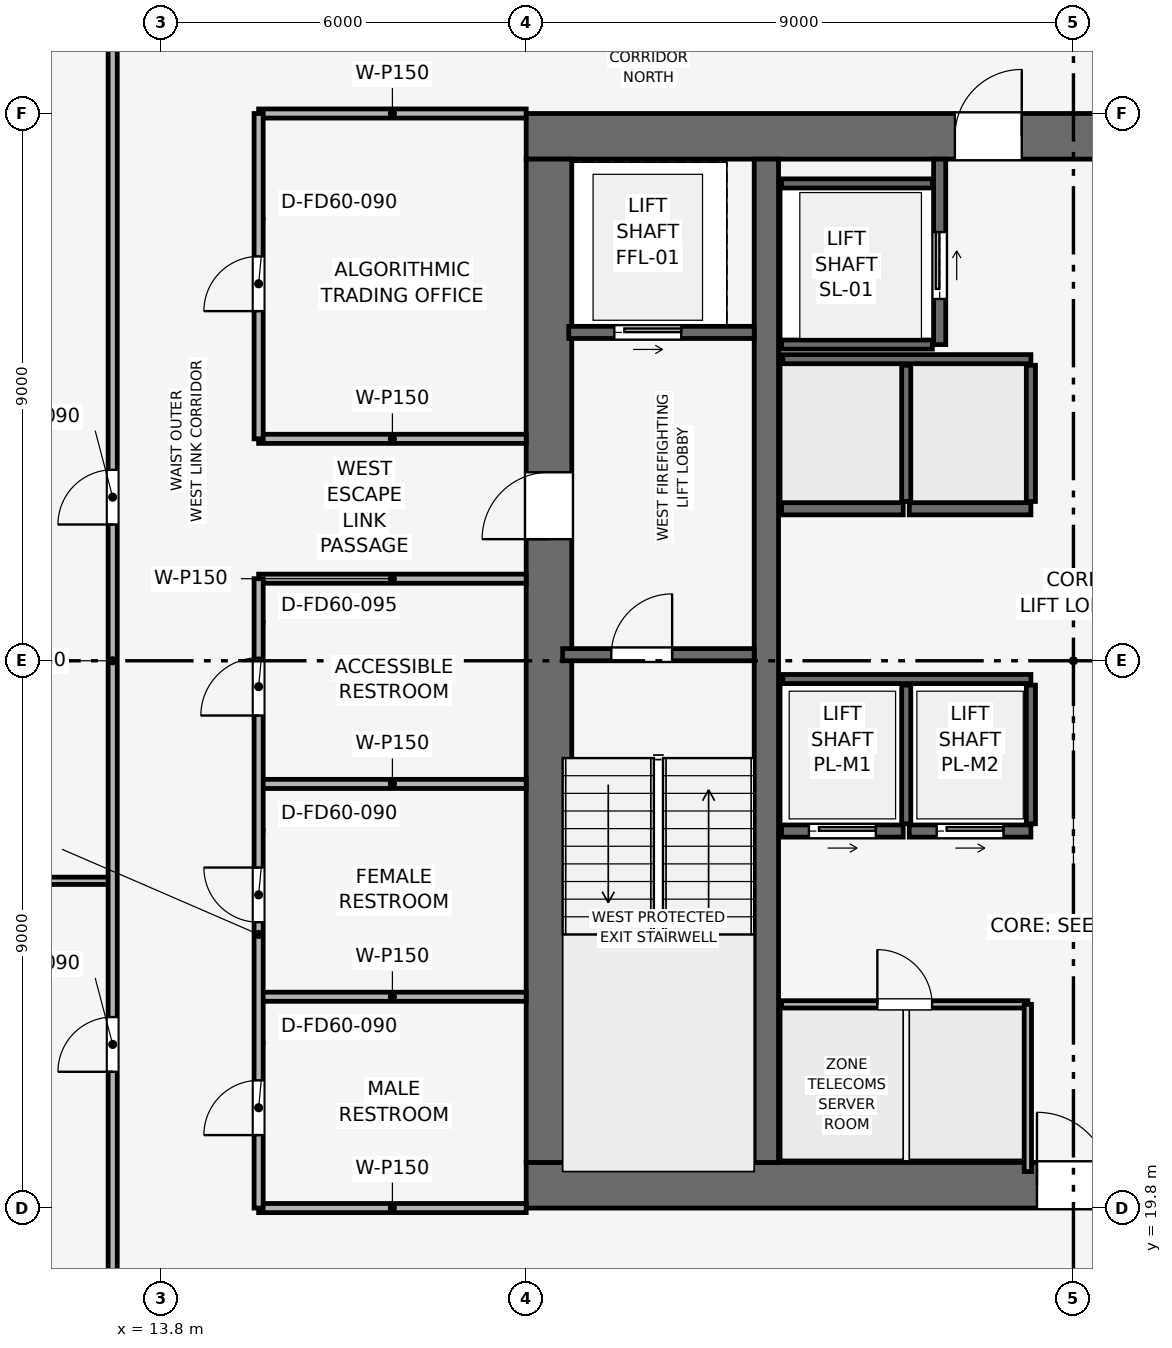
"""IFC4 building model, lengths in metres.
Left out: names, types, materials, properties, quantities, classifications, styles, units other than length and angle.
Written with IfcOpenShell. Run it as: python <this file> out.ifc"""

import sys

from ifc_helpers import new_model, si_unit, direction, frame, frame_2d, origin, place, context, subcontext, project, spatial, rectangle, extrude, element, fill, save


model = new_model("IFC4")
c1 = context("Model", 3, precision=1e-05, world=origin(), true_north=direction((0.0, 1.0)))
c2 = subcontext(c1, "Body", "Model", "MODEL_VIEW")
j1 = project(units=[si_unit("LENGTHUNIT", "METRE"), si_unit("PLANEANGLEUNIT", "RADIAN")], contexts=[c1])
p1 = place(None, origin())
s1 = spatial("IfcSite", under=j1, at=p1, CompositionType="ELEMENT")
p2 = place(p1, origin())
s2 = spatial("IfcBuilding", under=s1, at=p2, CompositionType="ELEMENT")
p3 = place(p2, frame((0.0, 0.0, 218.7)))
s3 = spatial("IfcBuildingStorey", under=s2, at=p3, CompositionType="ELEMENT", Elevation=218.7)
p4 = place(p3, frame((19.8, 20.175, 0.0), z_axis=(0.0, 0.0, 1.0), x_axis=(1.0, 0.0, 0.0)))
e1 = element("IfcWall", 1, at=p4, inside=s3, PredefinedType="SHEAR", context=c2, shape_type="SweptSolid", body=[
    extrude(rectangle(XDim=18.0, YDim=0.75, at=frame_2d((9.0, 0.0))), origin(), (0.0, 0.0, 1.0), 3.75),
])
p5 = place(p4, frame((8.4, 0.0, 0.0)))
e2 = element("IfcOpeningElement", 2, at=p5, cuts=e1, PredefinedType="OPENING", context=c2, shape_type="SweptSolid", body=[
    extrude(rectangle(XDim=1.2, YDim=2.2, at=frame_2d((0.6, 1.1))), frame((0.0, 0.385, 0.0), z_axis=(0.0, -1.0, 0.0), x_axis=(1.0, 0.0, 0.0)), (0.0, 0.0, 1.0), 0.77),
])
p6 = place(p3, frame((19.8, 37.425, 0.0), z_axis=(0.0, 0.0, 1.0), x_axis=(1.0, 0.0, 0.0)))
e3 = element("IfcWall", 3, at=p6, inside=s3, PredefinedType="SHEAR", context=c2, shape_type="SweptSolid", body=[
    extrude(rectangle(XDim=18.0, YDim=0.75, at=frame_2d((9.0, 0.0))), origin(), (0.0, 0.0, 1.0), 3.75),
])
p7 = place(p6, frame((7.05, 0.0, 0.0)))
e4 = element("IfcOpeningElement", 4, at=p7, cuts=e3, PredefinedType="OPENING", context=c2, shape_type="SweptSolid", body=[
    extrude(rectangle(XDim=1.1, YDim=2.15, at=frame_2d((0.55, 1.075))), frame((0.0, 0.385, 0.0), z_axis=(0.0, -1.0, 0.0), x_axis=(1.0, 0.0, 0.0)), (0.0, 0.0, 1.0), 0.77),
])
p8 = place(p3, frame((20.175, 20.55, 0.0), z_axis=(0.0, 0.0, 1.0), x_axis=(0.0, 1.0, 0.0)))
e5 = element("IfcWall", 5, at=p8, inside=s3, PredefinedType="SHEAR", context=c2, shape_type="SweptSolid", body=[
    extrude(rectangle(XDim=16.5, YDim=0.75, at=frame_2d((8.25, 0.0))), origin(), (0.0, 0.0, 1.0), 3.75),
])
p9 = place(p8, frame((10.25, 0.0, 0.0)))
e6 = element("IfcOpeningElement", 6, at=p9, cuts=e5, PredefinedType="OPENING", context=c2, shape_type="SweptSolid", body=[
    extrude(rectangle(XDim=1.1, YDim=2.15, at=frame_2d((0.55, 1.075))), frame((0.0, 0.385, 0.0), z_axis=(0.0, -1.0, 0.0), x_axis=(1.0, 0.0, 0.0)), (0.0, 0.0, 1.0), 0.77),
])
p10 = place(p3, frame((23.75, 20.55, 0.0), z_axis=(0.0, 0.0, 1.0), x_axis=(0.0, 1.0, 0.0)))
e7 = element("IfcWall", 7, at=p10, inside=s3, PredefinedType="SHEAR", context=c2, shape_type="SweptSolid", body=[
    extrude(rectangle(XDim=16.5, YDim=0.4, at=frame_2d((8.25, 0.0))), origin(), (0.0, 0.0, 1.0), 3.75),
])
p11 = place(p3, frame((20.4, 28.9, 0.0), z_axis=(0.0, 0.0, 1.0), x_axis=(1.0, 0.0, 0.0)))
e8 = element("IfcWall", 8, at=p11, inside=s3, PredefinedType="SHEAR", context=c2, shape_type="SweptSolid", body=[
    extrude(rectangle(XDim=3.15, YDim=0.2, at=frame_2d((1.575, 0.0))), origin(), (0.0, 0.0, 1.0), 3.5),
])
p12 = place(p11, frame((0.8, 0.0, 0.0)))
e9 = element("IfcOpeningElement", 9, at=p12, cuts=e8, PredefinedType="OPENING", context=c2, shape_type="SweptSolid", body=[
    extrude(rectangle(XDim=1.0, YDim=2.1, at=frame_2d((0.5, 1.05))), frame((0.0, 0.11, 0.0), z_axis=(0.0, -1.0, 0.0), x_axis=(1.0, 0.0, 0.0)), (0.0, 0.0, 1.0), 0.22),
])
p13 = place(p3, frame((20.5, 34.2, 0.0), z_axis=(0.0, 0.0, 1.0), x_axis=(1.0, 0.0, 0.0)))
e10 = element("IfcWall", 10, at=p13, inside=s3, PredefinedType="SHEAR", context=c2, shape_type="SweptSolid", body=[
    extrude(rectangle(XDim=3.05, YDim=0.2, at=frame_2d((1.525, 0.0))), origin(), (0.0, 0.0, 1.0), 3.5),
])
p14 = place(p13, frame((0.75, 0.0, 0.0)))
e11 = element("IfcOpeningElement", 11, at=p14, cuts=e10, PredefinedType="OPENING", context=c2, shape_type="SweptSolid", body=[
    extrude(rectangle(XDim=1.1, YDim=2.15, at=frame_2d((0.55, 1.075))), frame((0.0, 0.11, 0.0), z_axis=(0.0, -1.0, 0.0), x_axis=(1.0, 0.0, 0.0)), (0.0, 0.0, 1.0), 0.22),
])
p15 = place(p3, frame((26.6, 34.0, 0.0), z_axis=(0.0, 0.0, 1.0), x_axis=(0.0, 1.0, 0.0)))
e12 = element("IfcWall", 12, at=p15, inside=s3, PredefinedType="SHEAR", context=c2, shape_type="SweptSolid", body=[
    extrude(rectangle(XDim=3.05, YDim=0.2, at=frame_2d((1.525, 0.0))), origin(), (0.0, 0.0, 1.0), 3.5),
])
p16 = place(p15, frame((0.75, 0.0, 0.0)))
e13 = element("IfcOpeningElement", 13, at=p16, cuts=e12, PredefinedType="OPENING", context=c2, shape_type="SweptSolid", body=[
    extrude(rectangle(XDim=1.1, YDim=2.15, at=frame_2d((0.55, 1.075))), frame((0.0, 0.11, 0.0), z_axis=(0.0, -1.0, 0.0), x_axis=(1.0, 0.0, 0.0)), (0.0, 0.0, 1.0), 0.22),
])
for number, where, z_axis, x_axis in (
    (14, (24.0, 34.0, 0.0), (0.0, 0.0, 1.0), (1.0, 0.0, 0.0)),
    (15, (24.0, 36.65, 0.0), (0.0, 0.0, 1.0), (1.0, 0.0, 0.0)),
):
    element("IfcWall", number, at=place(p3, frame(where, z_axis=z_axis, x_axis=x_axis)), inside=s3, PredefinedType="SHEAR", context=c2, shape_type="SweptSolid", body=[
        extrude(rectangle(XDim=2.48, YDim=0.15, at=frame_2d((1.24, 0.0))), origin(), (0.0, 0.0, 1.0), 3.5),
    ])
p17 = place(p3, frame((24.0, 26.0, 0.0), z_axis=(0.0, 0.0, 1.0), x_axis=(1.0, 0.0, 0.0)))
e16 = element("IfcWall", 16, at=p17, inside=s3, PredefinedType="SHEAR", context=c2, shape_type="SweptSolid", body=[
    extrude(rectangle(XDim=2.0, YDim=0.2, at=frame_2d((1.0, 0.0))), origin(), (0.0, 0.0, 1.0), 3.5),
])
p18 = place(p17, frame((0.45, 0.0, 0.0)))
e17 = element("IfcOpeningElement", 17, at=p18, cuts=e16, PredefinedType="OPENING", context=c2, shape_type="SweptSolid", body=[
    extrude(rectangle(XDim=1.1, YDim=2.15, at=frame_2d((0.55, 1.075))), frame((0.0, 0.11, 0.0), z_axis=(0.0, -1.0, 0.0), x_axis=(1.0, 0.0, 0.0)), (0.0, 0.0, 1.0), 0.22),
])
p19 = place(p3, frame((26.1, 26.0, 0.0), z_axis=(0.0, 0.0, 1.0), x_axis=(1.0, 0.0, 0.0)))
e18 = element("IfcWall", 18, at=p19, inside=s3, PredefinedType="SHEAR", context=c2, shape_type="SweptSolid", body=[
    extrude(rectangle(XDim=2.0, YDim=0.2, at=frame_2d((1.0, 0.0))), origin(), (0.0, 0.0, 1.0), 3.5),
])
p20 = place(p19, frame((0.45, 0.0, 0.0)))
e19 = element("IfcOpeningElement", 19, at=p20, cuts=e18, PredefinedType="OPENING", context=c2, shape_type="SweptSolid", body=[
    extrude(rectangle(XDim=1.1, YDim=2.15, at=frame_2d((0.55, 1.075))), frame((0.0, 0.11, 0.0), z_axis=(0.0, -1.0, 0.0), x_axis=(1.0, 0.0, 0.0)), (0.0, 0.0, 1.0), 0.22),
])
for number, where, z_axis, x_axis in (
    (20, (24.0, 31.3, 0.0), (0.0, 0.0, 1.0), (1.0, 0.0, 0.0)),
    (21, (26.1, 31.3, 0.0), (0.0, 0.0, 1.0), (1.0, 0.0, 0.0)),
):
    element("IfcWall", number, at=place(p3, frame(where, z_axis=z_axis, x_axis=x_axis)), inside=s3, PredefinedType="SHEAR", context=c2, shape_type="SweptSolid", body=[
        extrude(rectangle(XDim=2.0, YDim=0.2, at=frame_2d((1.0, 0.0))), origin(), (0.0, 0.0, 1.0), 3.5),
    ])
p21 = place(p3, frame((24.02, 28.5, 0.0), z_axis=(0.0, 0.0, 1.0), x_axis=(1.0, 0.0, 0.0)))
e22 = element("IfcWall", 22, at=p21, inside=s3, PredefinedType="SHEAR", context=c2, shape_type="SweptSolid", body=[
    extrude(rectangle(XDim=4.08, YDim=0.15, at=frame_2d((2.04, 0.0))), origin(), (0.0, 0.0, 1.0), 3.5),
])
for number, where, z_axis, x_axis in (
    (23, (26.05, 26.12, 0.0), (0.0, 0.0, 1.0), (0.0, 1.0, 0.0)),
    (24, (28.1, 26.12, 0.0), (0.0, 0.0, 1.0), (0.0, 1.0, 0.0)),
):
    element("IfcWall", number, at=place(p3, frame(where, z_axis=z_axis, x_axis=x_axis)), inside=s3, PredefinedType="SHEAR", context=c2, shape_type="SweptSolid", body=[
        extrude(rectangle(XDim=2.28, YDim=0.15, at=frame_2d((1.14, 0.0))), origin(), (0.0, 0.0, 1.0), 3.5),
    ])
p22 = place(p3, frame((24.02, 33.76, 0.0), z_axis=(0.0, 0.0, 1.0), x_axis=(1.0, 0.0, 0.0)))
e25 = element("IfcWall", 25, at=p22, inside=s3, PredefinedType="SHEAR", context=c2, shape_type="SweptSolid", body=[
    extrude(rectangle(XDim=4.08, YDim=0.15, at=frame_2d((2.04, 0.0))), origin(), (0.0, 0.0, 1.0), 3.5),
])
for number, where, z_axis, x_axis in (
    (26, (26.05, 31.42, 0.0), (0.0, 0.0, 1.0), (0.0, 1.0, 0.0)),
    (27, (28.1, 31.42, 0.0), (0.0, 0.0, 1.0), (0.0, 1.0, 0.0)),
):
    element("IfcWall", number, at=place(p3, frame(where, z_axis=z_axis, x_axis=x_axis)), inside=s3, PredefinedType="SHEAR", context=c2, shape_type="SweptSolid", body=[
        extrude(rectangle(XDim=2.24, YDim=0.15, at=frame_2d((1.12, 0.0))), origin(), (0.0, 0.0, 1.0), 3.5),
    ])
p23 = place(p3, frame((24.0, 23.15, 0.0), z_axis=(0.0, 0.0, 1.0), x_axis=(1.0, 0.0, 0.0)))
e28 = element("IfcWall", 28, at=p23, inside=s3, PredefinedType="PARTITIONING", context=c2, shape_type="SweptSolid", body=[
    extrude(rectangle(XDim=4.05, YDim=0.12, at=frame_2d((2.025, 0.0))), origin(), (0.0, 0.0, 1.0), 3.5),
])
p24 = place(p23, frame((1.575, 0.0, 0.0)))
e29 = element("IfcOpeningElement", 29, at=p24, cuts=e28, PredefinedType="OPENING", context=c2, shape_type="SweptSolid", body=[
    extrude(rectangle(XDim=0.9, YDim=2.1, at=frame_2d((0.45, 1.05))), frame((0.0, 0.07, 0.0), z_axis=(0.0, -1.0, 0.0), x_axis=(1.0, 0.0, 0.0)), (0.0, 0.0, 1.0), 0.14),
])
p25 = place(p3, frame((28.05, 20.4, 0.0), z_axis=(0.0, 0.0, 1.0), x_axis=(0.0, 1.0, 0.0)))
e30 = element("IfcWall", 30, at=p25, inside=s3, PredefinedType="PARTITIONING", context=c2, shape_type="SweptSolid", body=[
    extrude(rectangle(XDim=2.75, YDim=0.12, at=frame_2d((1.375, 0.0))), origin(), (0.0, 0.0, 1.0), 3.5),
])
p26 = place(p3, frame((15.4, 19.8, 0.0), z_axis=(0.0, 0.0, 1.0), x_axis=(1.0, 0.0, 0.0)))
e31 = element("IfcWall", 31, at=p26, inside=s3, PredefinedType="PARTITIONING", context=c2, shape_type="SweptSolid", body=[
    extrude(rectangle(XDim=4.4, YDim=0.15, at=frame_2d((2.2, 0.0))), origin(), (0.0, 0.0, 1.0), 3.035),
])
for number, where, z_axis, x_axis in (
    (32, (15.4, 23.275, 0.0), (0.0, 0.0, 1.0), (1.0, 0.0, 0.0)),
    (33, (15.4, 26.775, 0.0), (0.0, 0.0, 1.0), (1.0, 0.0, 0.0)),
    (34, (15.4, 30.15, 0.0), (0.0, 0.0, 1.0), (1.0, 0.0, 0.0)),
    (35, (15.4, 32.45, 0.0), (0.0, 0.0, 1.0), (1.0, 0.0, 0.0)),
):
    element("IfcWall", number, at=place(p3, frame(where, z_axis=z_axis, x_axis=x_axis)), inside=s3, PredefinedType="PARTITIONING", context=c2, shape_type="SweptSolid", body=[
        extrude(rectangle(XDim=4.4, YDim=0.15, at=frame_2d((2.2, 0.0))), origin(), (0.0, 0.0, 1.0), 3.5),
    ])
p27 = place(p3, frame((15.4, 37.8, 0.0), z_axis=(0.0, 0.0, 1.0), x_axis=(1.0, 0.0, 0.0)))
e36 = element("IfcWall", 36, at=p27, inside=s3, PredefinedType="PARTITIONING", context=c2, shape_type="SweptSolid", body=[
    extrude(rectangle(XDim=4.4, YDim=0.15, at=frame_2d((2.2, 0.0))), origin(), (0.0, 0.0, 1.0), 3.035),
])
p28 = place(p3, frame((15.4, 19.8, 0.0), z_axis=(0.0, 0.0, 1.0), x_axis=(0.0, 1.0, 0.0)))
e37 = element("IfcWall", 37, at=p28, inside=s3, PredefinedType="PARTITIONING", context=c2, shape_type="SweptSolid", body=[
    extrude(rectangle(XDim=10.35, YDim=0.15, at=frame_2d((5.175, 0.0))), origin(), (0.0, 0.0, 1.0), 3.035),
])
p29 = place(p28, frame((1.2, 0.0, 0.0)))
e38 = element("IfcOpeningElement", 38, at=p29, cuts=e37, PredefinedType="OPENING", context=c2, shape_type="SweptSolid", body=[
    extrude(rectangle(XDim=0.9, YDim=2.1, at=frame_2d((0.45, 1.05))), frame((0.0, 0.085, 0.0), z_axis=(0.0, -1.0, 0.0), x_axis=(1.0, 0.0, 0.0)), (0.0, 0.0, 1.0), 0.17),
])
p30 = place(p28, frame((4.7, 0.0, 0.0)))
e39 = element("IfcOpeningElement", 39, at=p30, cuts=e37, PredefinedType="OPENING", context=c2, shape_type="SweptSolid", body=[
    extrude(rectangle(XDim=0.9, YDim=2.1, at=frame_2d((0.45, 1.05))), frame((0.0, 0.085, 0.0), z_axis=(0.0, -1.0, 0.0), x_axis=(1.0, 0.0, 0.0)), (0.0, 0.0, 1.0), 0.17),
])
p31 = place(p28, frame((8.1, 0.0, 0.0)))
e40 = element("IfcOpeningElement", 40, at=p31, cuts=e37, PredefinedType="OPENING", context=c2, shape_type="SweptSolid", body=[
    extrude(rectangle(XDim=0.95, YDim=2.1, at=frame_2d((0.475, 1.05))), frame((0.0, 0.085, 0.0), z_axis=(0.0, -1.0, 0.0), x_axis=(1.0, 0.0, 0.0)), (0.0, 0.0, 1.0), 0.17),
])
p32 = place(p3, frame((15.4, 32.45, 0.0), z_axis=(0.0, 0.0, 1.0), x_axis=(0.0, 1.0, 0.0)))
e41 = element("IfcWall", 41, at=p32, inside=s3, PredefinedType="PARTITIONING", context=c2, shape_type="SweptSolid", body=[
    extrude(rectangle(XDim=5.35, YDim=0.15, at=frame_2d((2.675, 0.0))), origin(), (0.0, 0.0, 1.0), 3.035),
])
p33 = place(p32, frame((2.1, 0.0, 0.0)))
e42 = element("IfcOpeningElement", 42, at=p33, cuts=e41, PredefinedType="OPENING", context=c2, shape_type="SweptSolid", body=[
    extrude(rectangle(XDim=0.9, YDim=2.1, at=frame_2d((0.45, 1.05))), frame((0.0, 0.085, 0.0), z_axis=(0.0, -1.0, 0.0), x_axis=(1.0, 0.0, 0.0)), (0.0, 0.0, 1.0), 0.17),
])
p34 = place(p3, frame((1.93, 25.182, 0.0), z_axis=(0.0, 0.0, 1.0), x_axis=(1.0, 0.0, 0.0)))
e43 = element("IfcWall", 43, at=p34, inside=s3, PredefinedType="PARTITIONING", context=c2, shape_type="SweptSolid", body=[
    extrude(rectangle(XDim=11.07, YDim=0.12, at=frame_2d((5.535, 0.0))), origin(), (0.0, 0.0, 1.0), 2.885),
])
p35 = place(p3, frame((13.0, 17.4, 0.0), z_axis=(0.0, 0.0, 1.0), x_axis=(0.0, 1.0, 0.0)))
e44 = element("IfcWall", 44, at=p35, inside=s3, PredefinedType="PARTITIONING", context=c2, shape_type="SweptSolid", body=[
    extrude(rectangle(XDim=22.8, YDim=0.15, at=frame_2d((11.4, 0.0))), origin(), (0.0, 0.0, 1.0), 3.035),
])
p36 = place(p35, frame((4.641, 0.0, 0.0)))
e45 = element("IfcOpeningElement", 45, at=p36, cuts=e44, PredefinedType="OPENING", context=c2, shape_type="SweptSolid", body=[
    extrude(rectangle(XDim=0.9, YDim=2.1, at=frame_2d((0.45, 1.05))), frame((0.0, 0.085, 0.0), z_axis=(0.0, -1.0, 0.0), x_axis=(1.0, 0.0, 0.0)), (0.0, 0.0, 1.0), 0.17),
])
p37 = place(p35, frame((13.641, 0.0, 0.0)))
e46 = element("IfcOpeningElement", 46, at=p37, cuts=e44, PredefinedType="OPENING", context=c2, shape_type="SweptSolid", body=[
    extrude(rectangle(XDim=0.9, YDim=2.1, at=frame_2d((0.45, 1.05))), frame((0.0, 0.085, 0.0), z_axis=(0.0, -1.0, 0.0), x_axis=(1.0, 0.0, 0.0)), (0.0, 0.0, 1.0), 0.17),
])
p38 = place(p12, origin())
e47 = element("IfcDoor", 47, at=p38, inside=s3, OperationType="SINGLE_SWING_RIGHT", PredefinedType="DOOR", context=c2, shape_type="SweptSolid", body=[
    extrude(rectangle(XDim=1.0, YDim=2.1, at=frame_2d((0.5, 1.05))), frame((0.0, 0.025, 0.0), z_axis=(0.0, -1.0, 0.0), x_axis=(1.0, 0.0, 0.0)), (0.0, 0.0, 1.0), 0.05),
])
fill(e9, e47)
p39 = place(p14, origin())
e48 = element("IfcDoor", 48, at=p39, inside=s3, OperationType="SLIDING_TO_RIGHT", PredefinedType="DOOR", context=c2, shape_type="SweptSolid", body=[
    extrude(rectangle(XDim=1.1, YDim=2.15, at=frame_2d((0.55, 1.075))), frame((0.0, 0.025, 0.0), z_axis=(0.0, -1.0, 0.0), x_axis=(1.0, 0.0, 0.0)), (0.0, 0.0, 1.0), 0.05),
])
fill(e11, e48)
p40 = place(p16, origin())
e49 = element("IfcDoor", 49, at=p40, inside=s3, OperationType="SLIDING_TO_RIGHT", PredefinedType="DOOR", context=c2, shape_type="SweptSolid", body=[
    extrude(rectangle(XDim=1.1, YDim=2.15, at=frame_2d((0.55, 1.075))), frame((0.0, 0.025, 0.0), z_axis=(0.0, -1.0, 0.0), x_axis=(1.0, 0.0, 0.0)), (0.0, 0.0, 1.0), 0.05),
])
fill(e13, e49)
p41 = place(p18, origin())
e50 = element("IfcDoor", 50, at=p41, inside=s3, OperationType="SLIDING_TO_RIGHT", PredefinedType="DOOR", context=c2, shape_type="SweptSolid", body=[
    extrude(rectangle(XDim=1.1, YDim=2.15, at=frame_2d((0.55, 1.075))), frame((0.0, 0.025, 0.0), z_axis=(0.0, -1.0, 0.0), x_axis=(1.0, 0.0, 0.0)), (0.0, 0.0, 1.0), 0.05),
])
fill(e17, e50)
p42 = place(p20, origin())
e51 = element("IfcDoor", 51, at=p42, inside=s3, OperationType="SLIDING_TO_RIGHT", PredefinedType="DOOR", context=c2, shape_type="SweptSolid", body=[
    extrude(rectangle(XDim=1.1, YDim=2.15, at=frame_2d((0.55, 1.075))), frame((0.0, 0.025, 0.0), z_axis=(0.0, -1.0, 0.0), x_axis=(1.0, 0.0, 0.0)), (0.0, 0.0, 1.0), 0.05),
])
fill(e19, e51)
p43 = place(p24, origin())
e52 = element("IfcDoor", 52, at=p43, inside=s3, OperationType="SINGLE_SWING_LEFT", PredefinedType="DOOR", context=c2, shape_type="SweptSolid", body=[
    extrude(rectangle(XDim=0.9, YDim=2.1, at=frame_2d((0.45, 1.05))), frame((0.0, 0.025, 0.0), z_axis=(0.0, -1.0, 0.0), x_axis=(1.0, 0.0, 0.0)), (0.0, 0.0, 1.0), 0.05),
])
fill(e29, e52)
p44 = place(p29, origin())
e53 = element("IfcDoor", 53, at=p44, inside=s3, OperationType="SINGLE_SWING_LEFT", PredefinedType="DOOR", context=c2, shape_type="SweptSolid", body=[
    extrude(rectangle(XDim=0.9, YDim=2.1, at=frame_2d((0.45, 1.05))), frame((0.0, 0.025, 0.0), z_axis=(0.0, -1.0, 0.0), x_axis=(1.0, 0.0, 0.0)), (0.0, 0.0, 1.0), 0.05),
])
fill(e38, e53)
p45 = place(p30, origin())
e54 = element("IfcDoor", 54, at=p45, inside=s3, OperationType="SINGLE_SWING_RIGHT", PredefinedType="DOOR", context=c2, shape_type="SweptSolid", body=[
    extrude(rectangle(XDim=0.9, YDim=2.1, at=frame_2d((0.45, 1.05))), frame((0.0, 0.025, 0.0), z_axis=(0.0, -1.0, 0.0), x_axis=(1.0, 0.0, 0.0)), (0.0, 0.0, 1.0), 0.05),
])
fill(e39, e54)
p46 = place(p31, origin())
e55 = element("IfcDoor", 55, at=p46, inside=s3, OperationType="SINGLE_SWING_LEFT", PredefinedType="DOOR", context=c2, shape_type="SweptSolid", body=[
    extrude(rectangle(XDim=0.95, YDim=2.1, at=frame_2d((0.475, 1.05))), frame((0.0, 0.025, 0.0), z_axis=(0.0, -1.0, 0.0), x_axis=(1.0, 0.0, 0.0)), (0.0, 0.0, 1.0), 0.05),
])
fill(e40, e55)
p47 = place(p33, origin())
e56 = element("IfcDoor", 56, at=p47, inside=s3, OperationType="SINGLE_SWING_LEFT", PredefinedType="DOOR", context=c2, shape_type="SweptSolid", body=[
    extrude(rectangle(XDim=0.9, YDim=2.1, at=frame_2d((0.45, 1.05))), frame((0.0, 0.025, 0.0), z_axis=(0.0, -1.0, 0.0), x_axis=(1.0, 0.0, 0.0)), (0.0, 0.0, 1.0), 0.05),
])
fill(e42, e56)
p48 = place(p36, origin())
e57 = element("IfcDoor", 57, at=p48, inside=s3, OperationType="SINGLE_SWING_LEFT", PredefinedType="DOOR", context=c2, shape_type="SweptSolid", body=[
    extrude(rectangle(XDim=0.9, YDim=2.1, at=frame_2d((0.45, 1.05))), frame((0.0, 0.025, 0.0), z_axis=(0.0, -1.0, 0.0), x_axis=(1.0, 0.0, 0.0)), (0.0, 0.0, 1.0), 0.05),
])
fill(e45, e57)
p49 = place(p37, origin())
e58 = element("IfcDoor", 58, at=p49, inside=s3, OperationType="SINGLE_SWING_LEFT", PredefinedType="DOOR", context=c2, shape_type="SweptSolid", body=[
    extrude(rectangle(XDim=0.9, YDim=2.1, at=frame_2d((0.45, 1.05))), frame((0.0, 0.025, 0.0), z_axis=(0.0, -1.0, 0.0), x_axis=(1.0, 0.0, 0.0)), (0.0, 0.0, 1.0), 0.05),
])
fill(e46, e58)
p50 = place(p9, origin())
e59 = element("IfcDoor", 59, at=p50, inside=s3, OperationType="SINGLE_SWING_LEFT", PredefinedType="DOOR", context=c2, shape_type="SweptSolid", body=[
    extrude(rectangle(XDim=1.1, YDim=2.15, at=frame_2d((0.55, 1.075))), frame((0.0, 0.025, 0.0), z_axis=(0.0, -1.0, 0.0), x_axis=(1.0, 0.0, 0.0)), (0.0, 0.0, 1.0), 0.05),
])
fill(e6, e59)
p51 = place(p5, origin())
e60 = element("IfcDoor", 60, at=p51, inside=s3, OperationType="SINGLE_SWING_LEFT", PredefinedType="DOOR", context=c2, shape_type="SweptSolid", body=[
    extrude(rectangle(XDim=1.2, YDim=2.2, at=frame_2d((0.6, 1.1))), frame((0.0, 0.025, 0.0), z_axis=(0.0, -1.0, 0.0), x_axis=(1.0, 0.0, 0.0)), (0.0, 0.0, 1.0), 0.05),
])
fill(e2, e60)
p52 = place(p7, origin())
e61 = element("IfcDoor", 61, at=p52, inside=s3, OperationType="SINGLE_SWING_RIGHT", PredefinedType="DOOR", context=c2, shape_type="SweptSolid", body=[
    extrude(rectangle(XDim=1.1, YDim=2.15, at=frame_2d((0.55, 1.075))), frame((0.0, 0.025, 0.0), z_axis=(0.0, -1.0, 0.0), x_axis=(1.0, 0.0, 0.0)), (0.0, 0.0, 1.0), 0.05),
])
fill(e4, e61)
save(model, sys.argv[1])
